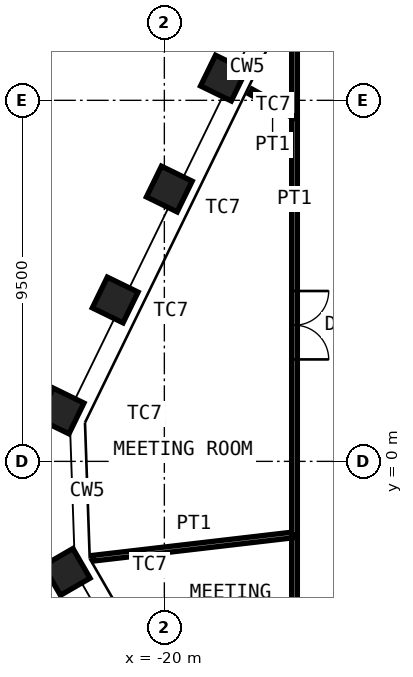
"""IFC4 building model, lengths in metres.
Left out: names, types, materials, properties, quantities, classifications, styles, units other than length and angle.
Written with IfcOpenShell. Run it as: python <this file> out.ifc"""

import sys

from ifc_helpers import new_model, si_unit, direction, frame, frame_2d, origin, origin_2d, place, context, subcontext, project, spatial, rectangle, hollow_rectangle, extrude, element, fill, save


model = new_model("IFC4")
c1 = context("Model", 3, precision=1e-05, world=origin(), true_north=direction((0.0, 1.0)))
c2 = subcontext(c1, "Body", "Model", "MODEL_VIEW")
j1 = project(units=[si_unit("LENGTHUNIT", "METRE"), si_unit("PLANEANGLEUNIT", "RADIAN")], contexts=[c1])
p1 = place(None, origin())
s1 = spatial("IfcSite", under=j1, at=p1, CompositionType="ELEMENT")
p2 = place(p1, origin())
s2 = spatial("IfcBuilding", under=s1, at=p2, CompositionType="ELEMENT")
p3 = place(p2, frame((0.0, 0.0, 278.8)))
s3 = spatial("IfcBuildingStorey", under=s2, at=p3, CompositionType="ELEMENT", Elevation=278.8)
for number, where, z_axis, x_axis in (
    (1, (-22.57, -2.908, 0.0), (0.0, 0.0, 1.0), (0.5, -0.866, 0.0)),
    (2, (-22.717, 1.327, 0.0), (0.0, 0.0, 1.0), (-0.438, -0.899, 0.0)),
    (3, (-21.293, 4.246, 0.0), (0.0, 0.0, 1.0), (-0.438, -0.899, 0.0)),
    (4, (-19.87, 7.166, 0.0), (0.0, 0.0, 1.0), (-0.438, -0.899, 0.0)),
    (5, (-18.446, 10.085, 0.0), (0.0, 0.0, 1.0), (-0.438, -0.899, 0.0)),
):
    element("IfcColumn", number, at=place(p3, frame(where, z_axis=z_axis, x_axis=x_axis)), inside=s3, PredefinedType="COLUMN", context=c2, shape_type="SweptSolid", body=[
        extrude(hollow_rectangle(XDim=0.9, YDim=0.9, WallThickness=0.06, at=origin_2d()), origin(), (0.0, 0.0, 1.0), 4.2),
    ])
p4 = place(p3, frame((-16.575, -7.248, 0.0), z_axis=(0.0, 0.0, 1.0), x_axis=(0.0, 1.0, 0.0)))
e6 = element("IfcWall", 6, at=p4, inside=s3, PredefinedType="PARTITIONING", context=c2, shape_type="SweptSolid", body=[
    extrude(rectangle(XDim=5.317, YDim=0.15, at=frame_2d((2.659, 0.0))), origin(), (0.0, 0.0, 1.0), 4.03),
])
p5 = place(p4, frame((2.159, 0.0, 0.0)))
e7 = element("IfcOpeningElement", 7, at=p5, cuts=e6, PredefinedType="OPENING", context=c2, shape_type="SweptSolid", body=[
    extrude(rectangle(XDim=1.0, YDim=2.4, at=frame_2d((0.5, 1.2))), frame((0.0, 0.085, 0.0), z_axis=(0.0, -1.0, 0.0), x_axis=(1.0, 0.0, 0.0)), (0.0, 0.0, 1.0), 0.17),
])
p6 = place(p3, frame((-21.864, -2.547, 0.0), z_axis=(0.0, 0.0, 1.0), x_axis=(0.993286690457, 0.115678652143, 0.0)))
e8 = element("IfcWall", 8, at=p6, inside=s3, PredefinedType="PARTITIONING", context=c2, shape_type="SweptSolid", body=[
    extrude(rectangle(XDim=5.325, YDim=0.15, at=frame_2d((2.662, 0.0))), origin(), (0.0, 0.0, 1.0), 2.93),
])
p7 = place(p3, frame((-16.575, -1.931, 0.0), z_axis=(0.0, 0.0, 1.0), x_axis=(0.0, 1.0, 0.0)))
e9 = element("IfcWall", 9, at=p7, inside=s3, PredefinedType="PARTITIONING", context=c2, shape_type="SweptSolid", body=[
    extrude(rectangle(XDim=11.028, YDim=0.15, at=frame_2d((5.514, 0.0))), origin(), (0.0, 0.0, 1.0), 4.03),
])
p8 = place(p7, frame((4.614, 0.0, 0.0)))
e10 = element("IfcOpeningElement", 10, at=p8, cuts=e9, PredefinedType="OPENING", context=c2, shape_type="SweptSolid", body=[
    extrude(rectangle(XDim=1.8, YDim=2.4, at=frame_2d((0.9, 1.2))), frame((0.0, 0.085, 0.0), z_axis=(0.0, -1.0, 0.0), x_axis=(1.0, 0.0, 0.0)), (0.0, 0.0, 1.0), 0.17),
])
p9 = place(p3, frame((-17.729, 9.73, 0.0), z_axis=(0.0, 0.0, 1.0), x_axis=(0.87667364743, -0.481085559855, 0.0)))
e11 = element("IfcWall", 11, at=p9, inside=s3, PredefinedType="PARTITIONING", context=c2, shape_type="SweptSolid", body=[
    extrude(rectangle(XDim=1.316, YDim=0.15, at=frame_2d((0.658, 0.0))), origin(), (0.0, 0.0, 1.0), 3.33),
])
p10 = place(p3, frame((-16.575, 9.097, 0.0), z_axis=(0.0, 0.0, 1.0), x_axis=(0.0, 1.0, 0.0)))
e12 = element("IfcWall", 12, at=p10, inside=s3, PredefinedType="PARTITIONING", context=c2, shape_type="SweptSolid", body=[
    extrude(rectangle(XDim=2.278, YDim=0.15, at=frame_2d((1.139, 0.0))), origin(), (0.0, 0.0, 1.0), 4.03),
])
p11 = place(p8, origin())
e13 = element("IfcDoor", 13, at=p11, inside=s3, OperationType="DOUBLE_DOOR_DOUBLE_SWING", PredefinedType="DOOR", context=c2, shape_type="SweptSolid", body=[
    extrude(rectangle(XDim=1.8, YDim=2.4, at=frame_2d((0.9, 1.2))), frame((0.0, 0.025, 0.0), z_axis=(0.0, -1.0, 0.0), x_axis=(1.0, 0.0, 0.0)), (0.0, 0.0, 1.0), 0.05),
])
fill(e10, e13)
save(model, sys.argv[1])
